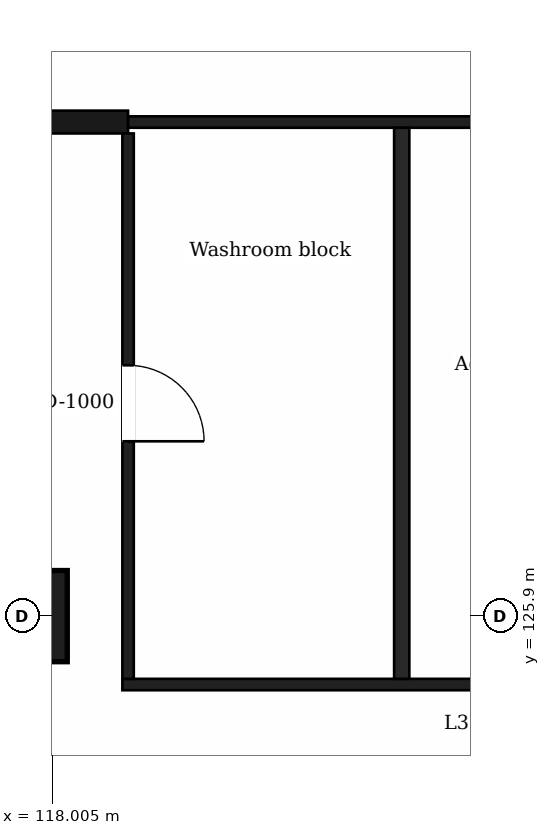
"""IFC4 building model, lengths in metres.
Left out: names, types, materials, properties, quantities, classifications, styles, units other than length and angle.
Written with IfcOpenShell. Run it as: python <this file> out.ifc"""

import sys

from ifc_helpers import new_model, si_unit, direction, frame, frame_2d, origin, origin_2d, place, context, subcontext, project, spatial, rectangle, extrude, element, fill, save


model = new_model("IFC4")
c1 = context("Model", 3, precision=1e-05, world=origin(), true_north=direction((0.0, 1.0)))
c2 = subcontext(c1, "Body", "Model", "MODEL_VIEW")
j1 = project(units=[si_unit("LENGTHUNIT", "METRE"), si_unit("PLANEANGLEUNIT", "RADIAN")], contexts=[c1])
p1 = place(None, origin())
s1 = spatial("IfcSite", under=j1, at=p1, CompositionType="ELEMENT")
p2 = place(p1, origin())
s2 = spatial("IfcBuilding", under=s1, at=p2, CompositionType="ELEMENT")
p3 = place(p2, frame((0.0, 0.0, 135.4)))
s3 = spatial("IfcBuildingStorey", under=s2, at=p3, CompositionType="ELEMENT", Elevation=135.4)
p4 = place(p3, frame((117.6, 125.9, 0.0), z_axis=(0.0, 0.0, 1.0), x_axis=(1.0, 0.0, 0.0)))
e1 = element("IfcColumn", 1, at=p4, inside=s3, PredefinedType="COLUMN", context=c2, shape_type="SweptSolid", body=[
    extrude(rectangle(XDim=1.2, YDim=1.2, at=origin_2d()), origin(), (0.0, 0.0, 1.0), 7.4),
])
p5 = place(p3, frame((118.925, 125.0, 0.0), z_axis=(0.0, 0.0, 1.0), x_axis=(1.0, 0.0, 0.0)))
e2 = element("IfcWall", 2, at=p5, inside=s3, PredefinedType="PARTITIONING", context=c2, shape_type="SweptSolid", body=[
    extrude(rectangle(XDim=7.075, YDim=0.15, at=frame_2d((3.538, 0.0))), origin(), (0.0, 0.0, 1.0), 6.9),
])
p6 = place(p5, frame((4.875, 0.0, 0.0)))
e3 = element("IfcOpeningElement", 3, at=p6, cuts=e2, PredefinedType="OPENING", context=c2, shape_type="SweptSolid", body=[
    extrude(rectangle(XDim=1.0, YDim=2.1, at=frame_2d((0.5, 1.05))), frame((0.0, 0.085, 0.0), z_axis=(0.0, -1.0, 0.0), x_axis=(1.0, 0.0, 0.0)), (0.0, 0.0, 1.0), 0.17),
])
p7 = place(p3, frame((113.4, 132.4, 0.0), z_axis=(0.0, 0.0, 1.0), x_axis=(1.0, 0.0, 0.0)))
e4 = element("IfcWall", 4, at=p7, inside=s3, PredefinedType="PARTITIONING", context=c2, shape_type="SweptSolid", body=[
    extrude(rectangle(XDim=5.6, YDim=0.3, at=frame_2d((2.8, 0.0))), origin(), (0.0, 0.0, 1.0), 1.0),
])
p8 = place(p3, frame((119.0, 132.4, 0.0), z_axis=(0.0, 0.0, 1.0), x_axis=(1.0, 0.0, 0.0)))
e5 = element("IfcWall", 5, at=p8, inside=s3, PredefinedType="PARTITIONING", context=c2, shape_type="SweptSolid", body=[
    extrude(rectangle(XDim=7.0, YDim=0.15, at=frame_2d((3.5, 0.0))), origin(), (0.0, 0.0, 1.0), 6.9),
])
p9 = place(p3, frame((119.0, 125.075, 0.0), z_axis=(0.0, 0.0, 1.0), x_axis=(0.0, 1.0, 0.0)))
e6 = element("IfcWall", 6, at=p9, inside=s3, PredefinedType="PARTITIONING", context=c2, shape_type="SweptSolid", body=[
    extrude(rectangle(XDim=7.175, YDim=0.15, at=frame_2d((3.587, 0.0))), origin(), (0.0, 0.0, 1.0), 6.9),
])
p10 = place(p9, frame((3.125, 0.0, 0.0)))
e7 = element("IfcOpeningElement", 7, at=p10, cuts=e6, PredefinedType="OPENING", context=c2, shape_type="SweptSolid", body=[
    extrude(rectangle(XDim=1.0, YDim=2.1, at=frame_2d((0.5, 1.05))), frame((0.0, 0.085, 0.0), z_axis=(0.0, -1.0, 0.0), x_axis=(1.0, 0.0, 0.0)), (0.0, 0.0, 1.0), 0.17),
])
p11 = place(p3, frame((122.6, 125.075, 0.0), z_axis=(0.0, 0.0, 1.0), x_axis=(0.0, 1.0, 0.0)))
e8 = element("IfcWall", 8, at=p11, inside=s3, PredefinedType="PARTITIONING", context=c2, shape_type="SweptSolid", body=[
    extrude(rectangle(XDim=7.25, YDim=0.2, at=frame_2d((3.625, 0.0))), origin(), (0.0, 0.0, 1.0), 6.9),
])
p12 = place(p10, origin())
e9 = element("IfcDoor", 9, at=p12, inside=s3, OperationType="SINGLE_SWING_LEFT", PredefinedType="DOOR", context=c2, shape_type="SweptSolid", body=[
    extrude(rectangle(XDim=1.0, YDim=2.1, at=frame_2d((0.5, 1.05))), frame((0.0, 0.025, 0.0), z_axis=(0.0, -1.0, 0.0), x_axis=(1.0, 0.0, 0.0)), (0.0, 0.0, 1.0), 0.05),
])
fill(e7, e9)
save(model, sys.argv[1])
